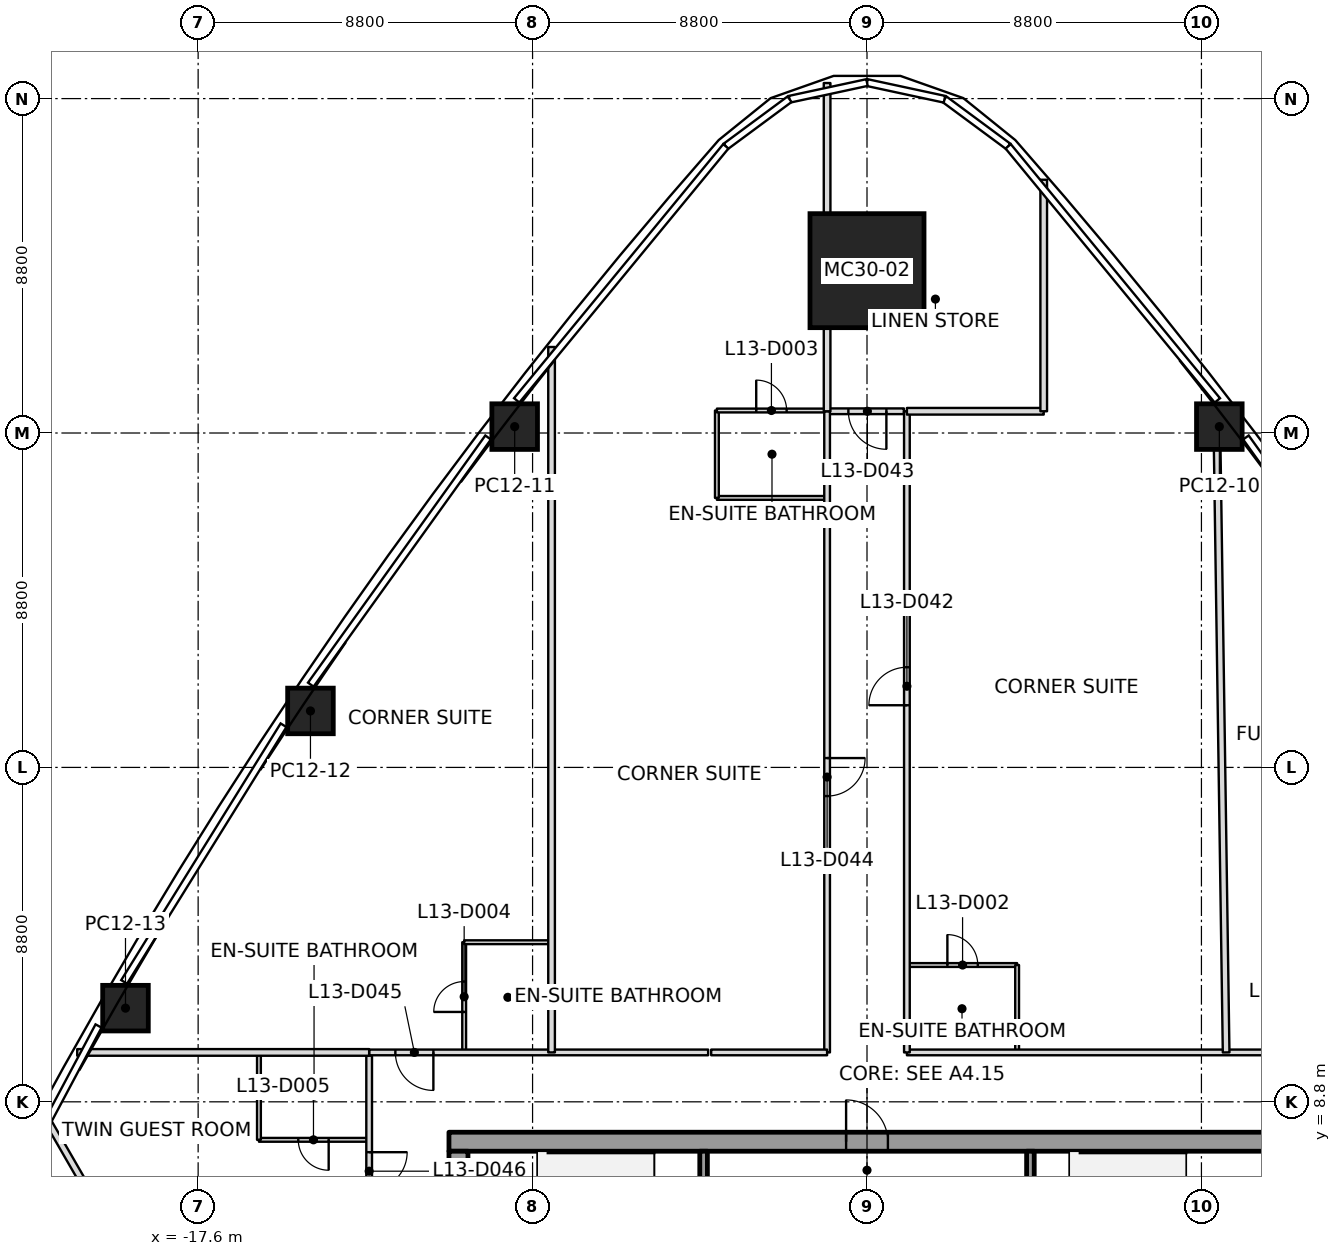
"""IFC4 building model, lengths in metres.
Left out: names, types, materials, properties, quantities, classifications, styles, units other than length and angle.
Written with IfcOpenShell. Run it as: python <this file> out.ifc"""

import sys

from ifc_helpers import new_model, si_unit, direction, frame, frame_2d, origin, origin_2d, place, context, subcontext, project, spatial, rectangle, extrude, element, fill, save


model = new_model("IFC4")
c1 = context("Model", 3, precision=1e-05, world=origin(), true_north=direction((0.0, 1.0)))
c2 = subcontext(c1, "Body", "Model", "MODEL_VIEW")
j1 = project(units=[si_unit("LENGTHUNIT", "METRE"), si_unit("PLANEANGLEUNIT", "RADIAN")], contexts=[c1])
p1 = place(None, origin())
s1 = spatial("IfcSite", under=j1, at=p1, CompositionType="ELEMENT")
p2 = place(p1, origin())
s2 = spatial("IfcBuilding", under=s1, at=p2, CompositionType="ELEMENT")
p3 = place(p2, frame((0.0, 0.0, 70.2)))
s3 = spatial("IfcBuildingStorey", under=s2, at=p3, CompositionType="ELEMENT", Elevation=70.2)
p4 = place(p3, frame((0.0, 30.672, 0.0), z_axis=(0.0, -0.035279904102, 0.999377470412), x_axis=(1.0, 0.0, 0.0)))
e1 = element("IfcColumn", 1, at=p4, inside=s3, PredefinedType="COLUMN", context=c2, shape_type="SweptSolid", body=[
    extrude(rectangle(XDim=3.0, YDim=3.0, at=origin_2d()), origin(), (0.0, 0.0, 1.0), 3.702),
])
for number, where, z_axis, x_axis in (
    (2, (9.271, 26.568, 0.0), (-0.0, -0.022, 1.0), (-0.61, 0.792, 0.018)),
    (3, (-9.271, 26.568, 0.0), (0.0, -0.022, 1.0), (0.61, 0.792, 0.018)),
):
    element("IfcColumn", number, at=place(p3, frame(where, z_axis=z_axis, x_axis=x_axis)), inside=s3, PredefinedType="COLUMN", context=c2, shape_type="SweptSolid", body=[
        extrude(rectangle(XDim=1.2, YDim=1.2, at=origin_2d()), origin(), (0.0, 0.0, 1.0), 3.701),
    ])
p5 = place(p3, frame((-14.644, 19.086, 0.0), z_axis=(0.005674011074, -0.014448935178, 0.999879509676), x_axis=(0.556135818375, 0.831044265652, 0.008853250663)))
e4 = element("IfcColumn", 4, at=p5, inside=s3, PredefinedType="COLUMN", context=c2, shape_type="SweptSolid", body=[
    extrude(rectangle(XDim=1.2, YDim=1.2, at=origin_2d()), origin(), (0.0, 0.0, 1.0), 3.7),
])
p6 = place(p3, frame((-19.512, 11.265, 0.0), z_axis=(0.010754701703, -0.006136118149, 0.999923339284), x_axis=(0.499971083262, 0.866042095943, -6.290806e-05)))
e5 = element("IfcColumn", 5, at=p6, inside=s3, PredefinedType="COLUMN", context=c2, shape_type="SweptSolid", body=[
    extrude(rectangle(XDim=1.2, YDim=1.2, at=origin_2d()), origin(), (0.0, 0.0, 1.0), 3.7),
])
p7 = place(p3, frame((-11.0, 7.75, 0.0), z_axis=(0.0, 0.0, 1.0), x_axis=(1.0, 0.0, 0.0)))
e6 = element("IfcWall", 6, at=p7, inside=s3, PredefinedType="SHEAR", context=c2, shape_type="SweptSolid", body=[
    extrude(rectangle(XDim=22.0, YDim=0.5, at=frame_2d((11.0, 0.0))), origin(), (0.0, 0.0, 1.0), 3.7),
])
p8 = place(p7, frame((10.45, 0.0, 0.0)))
e7 = element("IfcOpeningElement", 7, at=p8, cuts=e6, PredefinedType="OPENING", context=c2, shape_type="SweptSolid", body=[
    extrude(rectangle(XDim=1.1, YDim=2.1, at=frame_2d((0.55, 1.05))), frame((0.0, 0.25, 0.0), z_axis=(0.0, -1.0, 0.0), x_axis=(1.0, 0.0, 0.0)), (0.0, 0.0, 1.0), 0.5),
])
p9 = place(p3, frame((-10.75, -7.5, 0.0), z_axis=(0.0, 0.0, 1.0), x_axis=(0.0, 1.0, 0.0)))
e8 = element("IfcWall", 8, at=p9, inside=s3, PredefinedType="SHEAR", context=c2, shape_type="SweptSolid", body=[
    extrude(rectangle(XDim=15.0, YDim=0.5, at=frame_2d((7.5, 0.0))), origin(), (0.0, 0.0, 1.0), 3.7),
])
p10 = place(p9, frame((6.6, 0.0, 0.0)))
e9 = element("IfcOpeningElement", 9, at=p10, cuts=e8, PredefinedType="OPENING", context=c2, shape_type="SweptSolid", body=[
    extrude(rectangle(XDim=1.8, YDim=2.1, at=frame_2d((0.9, 1.05))), frame((0.0, 0.25, 0.0), z_axis=(0.0, -1.0, 0.0), x_axis=(1.0, 0.0, 0.0)), (0.0, 0.0, 1.0), 0.5),
])
p11 = place(p3, frame((-4.3, 4.6, 0.0), z_axis=(0.0, 0.0, 1.0), x_axis=(0.0, 1.0, 0.0)))
e10 = element("IfcWall", 10, at=p11, inside=s3, PredefinedType="SOLIDWALL", context=c2, shape_type="SweptSolid", body=[
    extrude(rectangle(XDim=2.9, YDim=0.2, at=frame_2d((1.45, 0.0))), origin(), (0.0, 0.0, 1.0), 3.55),
])
p12 = place(p11, frame((0.9, 0.0, 0.0)))
e11 = element("IfcOpeningElement", 11, at=p12, cuts=e10, PredefinedType="OPENING", context=c2, shape_type="SweptSolid", body=[
    extrude(rectangle(XDim=1.1, YDim=2.1, at=frame_2d((0.55, 1.05))), frame((0.0, 0.1, 0.0), z_axis=(0.0, -1.0, 0.0), x_axis=(1.0, 0.0, 0.0)), (0.0, 0.0, 1.0), 0.2),
])
p13 = place(p3, frame((4.3, 7.5, 0.0), z_axis=(0.0, 0.0, 1.0), x_axis=(0.0, -1.0, 0.0)))
e12 = element("IfcWall", 12, at=p13, inside=s3, PredefinedType="SOLIDWALL", context=c2, shape_type="SweptSolid", body=[
    extrude(rectangle(XDim=2.9, YDim=0.2, at=frame_2d((1.45, 0.0))), origin(), (0.0, 0.0, 1.0), 3.55),
])
p14 = place(p13, frame((0.9, 0.0, 0.0)))
e13 = element("IfcOpeningElement", 13, at=p14, cuts=e12, PredefinedType="OPENING", context=c2, shape_type="SweptSolid", body=[
    extrude(rectangle(XDim=1.1, YDim=2.1, at=frame_2d((0.55, 1.05))), frame((0.0, 0.1, 0.0), z_axis=(0.0, -1.0, 0.0), x_axis=(1.0, 0.0, 0.0)), (0.0, 0.0, 1.0), 0.2),
])
p15 = place(p3, frame((-20.375, 6.249, 0.0), z_axis=(0.0, 0.0, 1.0), x_axis=(-0.499999740363, 0.866025553686, 0.0)))
e14 = element("IfcWall", 14, at=p15, inside=s3, PredefinedType="PARTITIONING", context=c2, shape_type="SweptSolid", body=[
    extrude(rectangle(XDim=2.591, YDim=0.175, at=frame_2d((1.296, 0.0))), origin(), (0.0, 0.0, 1.0), 2.934),
])
p16 = place(p3, frame((-13.1, 10.1, 0.0), z_axis=(0.0, 0.0, 1.0), x_axis=(-1.0, 0.0, 0.0)))
e15 = element("IfcWall", 15, at=p16, inside=s3, PredefinedType="PARTITIONING", context=c2, shape_type="SweptSolid", body=[
    extrude(rectangle(XDim=7.682, YDim=0.175, at=frame_2d((3.841, 0.0))), origin(), (0.0, 0.0, 1.0), 2.934),
])
p17 = place(p3, frame((-8.3, 10.1, 0.0), z_axis=(0.0, 0.0, 1.0), x_axis=(0.0, 1.0, 0.0)))
e16 = element("IfcWall", 16, at=p17, inside=s3, PredefinedType="PARTITIONING", context=c2, shape_type="SweptSolid", body=[
    extrude(rectangle(XDim=18.563, YDim=0.175, at=frame_2d((9.282, 0.0))), origin(), (0.0, 0.0, 1.0), 2.934),
])
p18 = place(p3, frame((-1.05, 35.609, 0.0), z_axis=(0.0, 0.0, 1.0), x_axis=(0.0, -1.0, 0.0)))
e17 = element("IfcWall", 17, at=p18, inside=s3, PredefinedType="PARTITIONING", context=c2, shape_type="SweptSolid", body=[
    extrude(rectangle(XDim=8.637, YDim=0.175, at=frame_2d((4.319, 0.0))), origin(), (0.0, 0.0, 1.0), 2.934),
])
p19 = place(p3, frame((1.05, 26.972, 0.0), z_axis=(0.0, 0.0, 1.0), x_axis=(1.0, 0.0, 0.0)))
e18 = element("IfcWall", 18, at=p19, inside=s3, PredefinedType="PARTITIONING", context=c2, shape_type="SweptSolid", body=[
    extrude(rectangle(XDim=3.6, YDim=0.175, at=frame_2d((1.8, 0.0))), origin(), (0.0, 0.0, 1.0), 3.0),
])
p20 = place(p3, frame((4.65, 26.972, 0.0), z_axis=(0.0, 0.0, 1.0), x_axis=(0.0, 1.0, 0.0)))
e19 = element("IfcWall", 19, at=p20, inside=s3, PredefinedType="PARTITIONING", context=c2, shape_type="SweptSolid", body=[
    extrude(rectangle(XDim=6.093, YDim=0.175, at=frame_2d((3.046, 0.0))), origin(), (0.0, 0.0, 1.0), 2.934),
])
p21 = place(p3, frame((9.197, 27.185, 0.0), z_axis=(0.0, 0.0, 1.0), x_axis=(0.014803030732, -0.999890429138, 0.0)))
e20 = element("IfcWall", 20, at=p21, inside=s3, PredefinedType="PARTITIONING", context=c2, shape_type="SweptSolid", body=[
    extrude(rectangle(XDim=17.086, YDim=0.175, at=frame_2d((8.543, 0.0))), origin(), (0.0, 0.0, 1.0), 2.947),
])
p22 = place(p3, frame((-13.1, 10.02, 0.0), z_axis=(0.0, 0.0, 1.0), x_axis=(0.0, -1.0, 0.0)))
e21 = element("IfcWall", 21, at=p22, inside=s3, PredefinedType="PARTITIONING", context=c2, shape_type="SweptSolid", body=[
    extrude(rectangle(XDim=16.371, YDim=0.15, at=frame_2d((8.186, 0.0))), origin(), (0.0, 0.0, 1.0), 3.0),
])
p23 = place(p22, frame((2.545, 0.0, 0.0)))
e22 = element("IfcOpeningElement", 22, at=p23, cuts=e21, PredefinedType="OPENING", context=c2, shape_type="SweptSolid", body=[
    extrude(rectangle(XDim=1.0, YDim=2.1, at=frame_2d((0.5, 1.05))), frame((0.0, 0.075, 0.0), z_axis=(0.0, -1.0, 0.0), x_axis=(1.0, 0.0, 0.0)), (0.0, 0.0, 1.0), 0.15),
])
p24 = place(p22, frame((10.771, 0.0, 0.0)))
e23 = element("IfcOpeningElement", 23, at=p24, cuts=e21, PredefinedType="OPENING", context=c2, shape_type="SweptSolid", body=[
    extrude(rectangle(XDim=1.0, YDim=2.1, at=frame_2d((0.5, 1.05))), frame((0.0, 0.075, 0.0), z_axis=(0.0, -1.0, 0.0), x_axis=(1.0, 0.0, 0.0)), (0.0, 0.0, 1.0), 0.15),
])
p25 = place(p3, frame((-4.18, 10.1, 0.0), z_axis=(0.0, 0.0, 1.0), x_axis=(-1.0, 0.0, 0.0)))
e24 = element("IfcWall", 24, at=p25, inside=s3, PredefinedType="PARTITIONING", context=c2, shape_type="SweptSolid", body=[
    extrude(rectangle(XDim=8.92, YDim=0.15, at=frame_2d((4.46, 0.0))), origin(), (0.0, 0.0, 1.0), 2.947),
])
p26 = place(p25, frame((7.23, 0.0, 0.0)))
e25 = element("IfcOpeningElement", 25, at=p26, cuts=e24, PredefinedType="OPENING", context=c2, shape_type="SweptSolid", body=[
    extrude(rectangle(XDim=1.0, YDim=2.1, at=frame_2d((0.5, 1.05))), frame((0.0, 0.075, 0.0), z_axis=(0.0, -1.0, 0.0), x_axis=(1.0, 0.0, 0.0)), (0.0, 0.0, 1.0), 0.15),
])
p27 = place(p3, frame((0.97, 26.972, 0.0), z_axis=(0.0, 0.0, 1.0), x_axis=(-1.0, 0.0, 0.0)))
e26 = element("IfcWall", 26, at=p27, inside=s3, PredefinedType="PARTITIONING", context=c2, shape_type="SweptSolid", body=[
    extrude(rectangle(XDim=2.02, YDim=0.15, at=frame_2d((1.01, 0.0))), origin(), (0.0, 0.0, 1.0), 2.797),
])
p28 = place(p27, frame((0.46, 0.0, 0.0)))
e27 = element("IfcOpeningElement", 27, at=p28, cuts=e26, PredefinedType="OPENING", context=c2, shape_type="SweptSolid", body=[
    extrude(rectangle(XDim=1.0, YDim=2.1, at=frame_2d((0.5, 1.05))), frame((0.0, 0.075, 0.0), z_axis=(0.0, -1.0, 0.0), x_axis=(1.0, 0.0, 0.0)), (0.0, 0.0, 1.0), 0.15),
])
p29 = place(p3, frame((-1.05, 26.972, 0.0), z_axis=(0.0, 0.0, 1.0), x_axis=(0.0, -1.0, 0.0)))
e28 = element("IfcWall", 28, at=p29, inside=s3, PredefinedType="PARTITIONING", context=c2, shape_type="SweptSolid", body=[
    extrude(rectangle(XDim=16.872, YDim=0.15, at=frame_2d((8.436, 0.0))), origin(), (0.0, 0.0, 1.0), 2.947),
])
p30 = place(p29, frame((9.126, 0.0, 0.0)))
e29 = element("IfcOpeningElement", 29, at=p30, cuts=e28, PredefinedType="OPENING", context=c2, shape_type="SweptSolid", body=[
    extrude(rectangle(XDim=1.0, YDim=2.1, at=frame_2d((0.5, 1.05))), frame((0.0, 0.075, 0.0), z_axis=(0.0, -1.0, 0.0), x_axis=(1.0, 0.0, 0.0)), (0.0, 0.0, 1.0), 0.15),
])
p31 = place(p3, frame((-1.05, 10.1, 0.0), z_axis=(0.0, 0.0, 1.0), x_axis=(-1.0, 0.0, 0.0)))
e30 = element("IfcWall", 30, at=p31, inside=s3, PredefinedType="PARTITIONING", context=c2, shape_type="SweptSolid", body=[
    extrude(rectangle(XDim=3.05, YDim=0.15, at=frame_2d((1.525, 0.0))), origin(), (0.0, 0.0, 1.0), 3.0),
])
p32 = place(p3, frame((13.02, 10.1, 0.0), z_axis=(0.0, 0.0, 1.0), x_axis=(-1.0, 0.0, 0.0)))
e31 = element("IfcWall", 31, at=p32, inside=s3, PredefinedType="PARTITIONING", context=c2, shape_type="SweptSolid", body=[
    extrude(rectangle(XDim=11.97, YDim=0.15, at=frame_2d((5.985, 0.0))), origin(), (0.0, 0.0, 1.0), 2.947),
])
p33 = place(p32, frame((1.235, 0.0, 0.0)))
e32 = element("IfcOpeningElement", 32, at=p33, cuts=e31, PredefinedType="OPENING", context=c2, shape_type="SweptSolid", body=[
    extrude(rectangle(XDim=1.0, YDim=2.1, at=frame_2d((0.5, 1.05))), frame((0.0, 0.075, 0.0), z_axis=(0.0, -1.0, 0.0), x_axis=(1.0, 0.0, 0.0)), (0.0, 0.0, 1.0), 0.15),
])
p34 = place(p3, frame((1.05, 10.1, 0.0), z_axis=(0.0, 0.0, 1.0), x_axis=(0.0, 1.0, 0.0)))
e33 = element("IfcWall", 33, at=p34, inside=s3, PredefinedType="PARTITIONING", context=c2, shape_type="SweptSolid", body=[
    extrude(rectangle(XDim=16.872, YDim=0.15, at=frame_2d((8.436, 0.0))), origin(), (0.0, 0.0, 1.0), 2.947),
])
p35 = place(p34, frame((9.136, 0.0, 0.0)))
e34 = element("IfcOpeningElement", 34, at=p35, cuts=e33, PredefinedType="OPENING", context=c2, shape_type="SweptSolid", body=[
    extrude(rectangle(XDim=1.0, YDim=2.1, at=frame_2d((0.5, 1.05))), frame((0.0, 0.075, 0.0), z_axis=(0.0, -1.0, 0.0), x_axis=(1.0, 0.0, 0.0)), (0.0, 0.0, 1.0), 0.15),
])
p36 = place(p3, frame((-13.13, 7.8, 0.0), z_axis=(0.0, 0.0, 1.0), x_axis=(-1.0, 0.0, 0.0)))
e35 = element("IfcWall", 35, at=p36, inside=s3, PredefinedType="PARTITIONING", context=c2, shape_type="SweptSolid", body=[
    extrude(rectangle(XDim=2.87, YDim=0.1, at=frame_2d((1.435, 0.0))), origin(), (0.0, 0.0, 1.0), 3.0),
])
p37 = place(p36, frame((1.035, 0.0, 0.0)))
e36 = element("IfcOpeningElement", 36, at=p37, cuts=e35, PredefinedType="OPENING", context=c2, shape_type="SweptSolid", body=[
    extrude(rectangle(XDim=0.8, YDim=2.1, at=frame_2d((0.4, 1.05))), frame((0.0, 0.05, 0.0), z_axis=(0.0, -1.0, 0.0), x_axis=(1.0, 0.0, 0.0)), (0.0, 0.0, 1.0), 0.1),
])
p38 = place(p3, frame((-16.0, 7.8, 0.0), z_axis=(0.0, 0.0, 1.0), x_axis=(0.0, 1.0, 0.0)))
e37 = element("IfcWall", 37, at=p38, inside=s3, PredefinedType="PARTITIONING", context=c2, shape_type="SweptSolid", body=[
    extrude(rectangle(XDim=2.27, YDim=0.1, at=frame_2d((1.135, 0.0))), origin(), (0.0, 0.0, 1.0), 3.0),
])
p39 = place(p3, frame((-10.6, 10.13, 0.0), z_axis=(0.0, 0.0, 1.0), x_axis=(0.0, 1.0, 0.0)))
e38 = element("IfcWall", 38, at=p39, inside=s3, PredefinedType="PARTITIONING", context=c2, shape_type="SweptSolid", body=[
    extrude(rectangle(XDim=2.87, YDim=0.1, at=frame_2d((1.435, 0.0))), origin(), (0.0, 0.0, 1.0), 3.0),
])
p40 = place(p39, frame((1.035, 0.0, 0.0)))
e39 = element("IfcOpeningElement", 39, at=p40, cuts=e38, PredefinedType="OPENING", context=c2, shape_type="SweptSolid", body=[
    extrude(rectangle(XDim=0.8, YDim=2.1, at=frame_2d((0.4, 1.05))), frame((0.0, 0.05, 0.0), z_axis=(0.0, -1.0, 0.0), x_axis=(1.0, 0.0, 0.0)), (0.0, 0.0, 1.0), 0.1),
])
p41 = place(p3, frame((-10.6, 13.0, 0.0), z_axis=(0.0, 0.0, 1.0), x_axis=(1.0, 0.0, 0.0)))
e40 = element("IfcWall", 40, at=p41, inside=s3, PredefinedType="PARTITIONING", context=c2, shape_type="SweptSolid", body=[
    extrude(rectangle(XDim=2.27, YDim=0.1, at=frame_2d((1.135, 0.0))), origin(), (0.0, 0.0, 1.0), 2.947),
])
p42 = place(p3, frame((-1.08, 24.692, 0.0), z_axis=(0.0, 0.0, 1.0), x_axis=(-1.0, 0.0, 0.0)))
e41 = element("IfcWall", 41, at=p42, inside=s3, PredefinedType="PARTITIONING", context=c2, shape_type="SweptSolid", body=[
    extrude(rectangle(XDim=2.87, YDim=0.1, at=frame_2d((1.435, 0.0))), origin(), (0.0, 0.0, 1.0), 3.0),
])
p43 = place(p3, frame((-3.95, 24.692, 0.0), z_axis=(0.0, 0.0, 1.0), x_axis=(0.0, 1.0, 0.0)))
e42 = element("IfcWall", 42, at=p43, inside=s3, PredefinedType="PARTITIONING", context=c2, shape_type="SweptSolid", body=[
    extrude(rectangle(XDim=2.3, YDim=0.1, at=frame_2d((1.15, 0.0))), origin(), (0.0, 0.0, 1.0), 3.0),
])
p44 = place(p3, frame((-3.95, 26.992, 0.0), z_axis=(0.0, 0.0, 1.0), x_axis=(1.0, 0.0, 0.0)))
e43 = element("IfcWall", 43, at=p44, inside=s3, PredefinedType="PARTITIONING", context=c2, shape_type="SweptSolid", body=[
    extrude(rectangle(XDim=2.87, YDim=0.1, at=frame_2d((1.435, 0.0))), origin(), (0.0, 0.0, 1.0), 3.0),
])
p45 = place(p44, frame((1.035, 0.0, 0.0)))
e44 = element("IfcOpeningElement", 44, at=p45, cuts=e43, PredefinedType="OPENING", context=c2, shape_type="SweptSolid", body=[
    extrude(rectangle(XDim=0.8, YDim=2.1, at=frame_2d((0.4, 1.05))), frame((0.0, 0.05, 0.0), z_axis=(0.0, -1.0, 0.0), x_axis=(1.0, 0.0, 0.0)), (0.0, 0.0, 1.0), 0.1),
])
p46 = place(p3, frame((1.08, 12.4, 0.0), z_axis=(0.0, 0.0, 1.0), x_axis=(1.0, 0.0, 0.0)))
e45 = element("IfcWall", 45, at=p46, inside=s3, PredefinedType="PARTITIONING", context=c2, shape_type="SweptSolid", body=[
    extrude(rectangle(XDim=2.87, YDim=0.1, at=frame_2d((1.435, 0.0))), origin(), (0.0, 0.0, 1.0), 3.0),
])
p47 = place(p46, frame((1.035, 0.0, 0.0)))
e46 = element("IfcOpeningElement", 46, at=p47, cuts=e45, PredefinedType="OPENING", context=c2, shape_type="SweptSolid", body=[
    extrude(rectangle(XDim=0.8, YDim=2.1, at=frame_2d((0.4, 1.05))), frame((0.0, 0.05, 0.0), z_axis=(0.0, -1.0, 0.0), x_axis=(1.0, 0.0, 0.0)), (0.0, 0.0, 1.0), 0.1),
])
p48 = place(p3, frame((3.95, 12.4, 0.0), z_axis=(0.0, 0.0, 1.0), x_axis=(0.0, -1.0, 0.0)))
e47 = element("IfcWall", 47, at=p48, inside=s3, PredefinedType="PARTITIONING", context=c2, shape_type="SweptSolid", body=[
    extrude(rectangle(XDim=2.27, YDim=0.1, at=frame_2d((1.135, 0.0))), origin(), (0.0, 0.0, 1.0), 3.0),
])
p49 = place(p35, origin())
e48 = element("IfcDoor", 48, at=p49, inside=s3, OperationType="SINGLE_SWING_RIGHT", PredefinedType="DOOR", context=c2, shape_type="SweptSolid", body=[
    extrude(rectangle(XDim=1.0, YDim=2.1, at=frame_2d((0.5, 1.05))), frame((0.0, 0.025, 0.0), z_axis=(0.0, -1.0, 0.0), x_axis=(1.0, 0.0, 0.0)), (0.0, 0.0, 1.0), 0.05),
])
fill(e34, e48)
p50 = place(p47, origin())
e49 = element("IfcDoor", 49, at=p50, inside=s3, OperationType="SINGLE_SWING_LEFT", PredefinedType="DOOR", context=c2, shape_type="SweptSolid", body=[
    extrude(rectangle(XDim=0.8, YDim=2.1, at=frame_2d((0.4, 1.05))), frame((0.0, 0.025, 0.0), z_axis=(0.0, -1.0, 0.0), x_axis=(1.0, 0.0, 0.0)), (0.0, 0.0, 1.0), 0.05),
])
fill(e46, e49)
p51 = place(p28, origin())
e50 = element("IfcDoor", 50, at=p51, inside=s3, OperationType="SINGLE_SWING_LEFT", PredefinedType="DOOR", context=c2, shape_type="SweptSolid", body=[
    extrude(rectangle(XDim=1.0, YDim=2.1, at=frame_2d((0.5, 1.05))), frame((0.0, 0.025, 0.0), z_axis=(0.0, -1.0, 0.0), x_axis=(1.0, 0.0, 0.0)), (0.0, 0.0, 1.0), 0.05),
])
fill(e27, e50)
p52 = place(p30, origin())
e51 = element("IfcDoor", 51, at=p52, inside=s3, OperationType="SINGLE_SWING_RIGHT", PredefinedType="DOOR", context=c2, shape_type="SweptSolid", body=[
    extrude(rectangle(XDim=1.0, YDim=2.1, at=frame_2d((0.5, 1.05))), frame((0.0, 0.025, 0.0), z_axis=(0.0, -1.0, 0.0), x_axis=(1.0, 0.0, 0.0)), (0.0, 0.0, 1.0), 0.05),
])
fill(e29, e51)
p53 = place(p45, origin())
e52 = element("IfcDoor", 52, at=p53, inside=s3, OperationType="SINGLE_SWING_RIGHT", PredefinedType="DOOR", context=c2, shape_type="SweptSolid", body=[
    extrude(rectangle(XDim=0.8, YDim=2.1, at=frame_2d((0.4, 1.05))), frame((0.0, 0.025, 0.0), z_axis=(0.0, -1.0, 0.0), x_axis=(1.0, 0.0, 0.0)), (0.0, 0.0, 1.0), 0.05),
])
fill(e44, e52)
p54 = place(p26, origin())
e53 = element("IfcDoor", 53, at=p54, inside=s3, OperationType="SINGLE_SWING_LEFT", PredefinedType="DOOR", context=c2, shape_type="SweptSolid", body=[
    extrude(rectangle(XDim=1.0, YDim=2.1, at=frame_2d((0.5, 1.05))), frame((0.0, 0.025, 0.0), z_axis=(0.0, -1.0, 0.0), x_axis=(1.0, 0.0, 0.0)), (0.0, 0.0, 1.0), 0.05),
])
fill(e25, e53)
p55 = place(p40, origin())
e54 = element("IfcDoor", 54, at=p55, inside=s3, OperationType="SINGLE_SWING_LEFT", PredefinedType="DOOR", context=c2, shape_type="SweptSolid", body=[
    extrude(rectangle(XDim=0.8, YDim=2.1, at=frame_2d((0.4, 1.05))), frame((0.0, 0.025, 0.0), z_axis=(0.0, -1.0, 0.0), x_axis=(1.0, 0.0, 0.0)), (0.0, 0.0, 1.0), 0.05),
])
fill(e39, e54)
p56 = place(p23, origin())
e55 = element("IfcDoor", 55, at=p56, inside=s3, OperationType="SINGLE_SWING_LEFT", PredefinedType="DOOR", context=c2, shape_type="SweptSolid", body=[
    extrude(rectangle(XDim=1.0, YDim=2.1, at=frame_2d((0.5, 1.05))), frame((0.0, 0.025, 0.0), z_axis=(0.0, -1.0, 0.0), x_axis=(1.0, 0.0, 0.0)), (0.0, 0.0, 1.0), 0.05),
])
fill(e22, e55)
p57 = place(p37, origin())
e56 = element("IfcDoor", 56, at=p57, inside=s3, OperationType="SINGLE_SWING_LEFT", PredefinedType="DOOR", context=c2, shape_type="SweptSolid", body=[
    extrude(rectangle(XDim=0.8, YDim=2.1, at=frame_2d((0.4, 1.05))), frame((0.0, 0.025, 0.0), z_axis=(0.0, -1.0, 0.0), x_axis=(1.0, 0.0, 0.0)), (0.0, 0.0, 1.0), 0.05),
])
fill(e36, e56)
p58 = place(p8, origin())
e57 = element("IfcDoor", 57, at=p58, inside=s3, OperationType="SINGLE_SWING_RIGHT", PredefinedType="DOOR", context=c2, shape_type="SweptSolid", body=[
    extrude(rectangle(XDim=1.1, YDim=2.1, at=frame_2d((0.55, 1.05))), frame((0.0, 0.025, 0.0), z_axis=(0.0, -1.0, 0.0), x_axis=(1.0, 0.0, 0.0)), (0.0, 0.0, 1.0), 0.05),
])
fill(e7, e57)
save(model, sys.argv[1])
